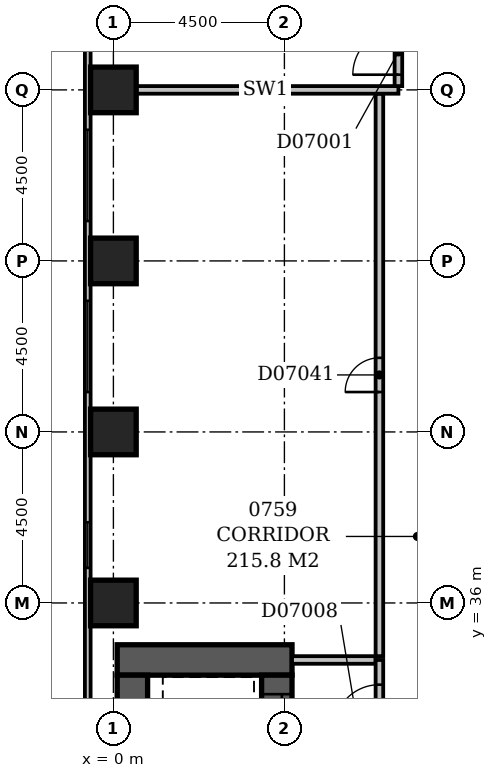
"""IFC4 building model, lengths in metres.
Left out: names, types, materials, properties, quantities, classifications, styles, units other than length and angle.
Written with IfcOpenShell. Run it as: python <this file> out.ifc"""

import sys

from ifc_helpers import new_model, si_unit, direction, frame, frame_2d, origin, origin_2d, place, context, subcontext, project, spatial, rectangle, extrude, element, fill, save


model = new_model("IFC4")
c1 = context("Model", 3, precision=1e-05, world=origin(), true_north=direction((0.0, 1.0)))
c2 = subcontext(c1, "Body", "Model", "MODEL_VIEW")
j1 = project(units=[si_unit("LENGTHUNIT", "METRE"), si_unit("PLANEANGLEUNIT", "RADIAN")], contexts=[c1])
p1 = place(None, origin())
s1 = spatial("IfcSite", under=j1, at=p1, CompositionType="ELEMENT")
p2 = place(p1, origin())
s2 = spatial("IfcBuilding", under=s1, at=p2, CompositionType="ELEMENT")
p3 = place(p2, frame((0.0, 0.0, 36.2)))
s3 = spatial("IfcBuildingStorey", under=s2, at=p3, CompositionType="ELEMENT", Elevation=36.2)
p4 = place(p3, frame((0.1, 34.5, -0.3), z_axis=(0.0, 0.0, 1.0), x_axis=(1.0, 0.0, 0.0)))
e1 = element("IfcWall", 1, at=p4, inside=s3, PredefinedType="SHEAR", context=c2, shape_type="SweptSolid", body=[
    extrude(rectangle(XDim=4.6, YDim=0.8, at=frame_2d((2.3, 0.0))), origin(), (0.0, 0.0, 1.0), 3.6),
])
p5 = place(p3, frame((0.5, 27.15, -0.3), z_axis=(0.0, 0.0, 1.0), x_axis=(0.0, 1.0, 0.0)))
e2 = element("IfcWall", 2, at=p5, inside=s3, PredefinedType="SHEAR", context=c2, shape_type="SweptSolid", body=[
    extrude(rectangle(XDim=6.95, YDim=0.8, at=frame_2d((3.475, 0.0))), origin(), (0.0, 0.0, 1.0), 3.6),
])
p6 = place(p3, frame((4.3, 27.15, -0.3), z_axis=(0.0, 0.0, 1.0), x_axis=(0.0, 1.0, 0.0)))
e3 = element("IfcWall", 3, at=p6, inside=s3, PredefinedType="SHEAR", context=c2, shape_type="SweptSolid", body=[
    extrude(rectangle(XDim=6.95, YDim=0.8, at=frame_2d((3.475, 0.0))), origin(), (0.0, 0.0, 1.0), 3.6),
])
p7 = place(p6, frame((3.05, 0.0, 0.3)))
e4 = element("IfcOpeningElement", 4, at=p7, cuts=e3, PredefinedType="OPENING", context=c2, shape_type="SweptSolid", body=[
    extrude(rectangle(XDim=1.1, YDim=2.1, at=frame_2d((0.55, 1.05))), frame((0.0, 0.412, 0.0), z_axis=(0.0, -1.0, 0.0), x_axis=(1.0, 0.0, 0.0)), (0.0, 0.0, 1.0), 0.824),
])
p8 = place(p6, frame((0.55, 0.0, 0.3)))
e5 = element("IfcOpeningElement", 5, at=p8, cuts=e3, PredefinedType="OPENING", context=c2, shape_type="SweptSolid", body=[
    extrude(rectangle(XDim=1.1, YDim=2.1, at=frame_2d((0.55, 1.05))), frame((0.0, 0.412, 0.0), z_axis=(0.0, -1.0, 0.0), x_axis=(1.0, 0.0, 0.0)), (0.0, 0.0, 1.0), 0.824),
])
p9 = place(p6, frame((5.35, 0.0, 0.3)))
e6 = element("IfcOpeningElement", 6, at=p9, cuts=e3, PredefinedType="OPENING", context=c2, shape_type="SweptSolid", body=[
    extrude(rectangle(XDim=1.1, YDim=2.1, at=frame_2d((0.55, 1.05))), frame((0.0, 0.412, 0.0), z_axis=(0.0, -1.0, 0.0), x_axis=(1.0, 0.0, 0.0)), (0.0, 0.0, 1.0), 0.824),
])
for number, where, z_axis, x_axis in (
    (7, (0.0, 36.0, -0.3), (0.0, 0.0, 1.0), (1.0, 0.0, 0.0)),
    (8, (0.0, 40.5, -0.3), (0.0, 0.0, 1.0), (1.0, 0.0, 0.0)),
    (9, (0.0, 45.0, -0.3), (0.0, 0.0, 1.0), (1.0, 0.0, 0.0)),
    (10, (0.0, 49.5, -0.3), (0.0, 0.0, 1.0), (1.0, 0.0, 0.0)),
):
    element("IfcColumn", number, at=place(p3, frame(where, z_axis=z_axis, x_axis=x_axis)), inside=s3, PredefinedType="COLUMN", context=c2, shape_type="SweptSolid", body=[
        extrude(rectangle(XDim=1.2, YDim=1.2, at=origin_2d()), origin(), (0.0, 0.0, 1.0), 3.6),
    ])
p10 = place(p3, frame((-0.675, 59.1, 0.0), z_axis=(0.0, 0.0, 1.0), x_axis=(0.0, -1.0, 0.0)))
e11 = element("IfcWall", 11, at=p10, inside=s3, PredefinedType="STANDARD", context=c2, shape_type="SweptSolid", body=[
    extrude(rectangle(XDim=55.35, YDim=0.15, at=frame_2d((27.675, 0.0))), origin(), (0.0, 0.0, 1.0), 2.7),
])
p11 = place(p10, frame((10.65, 0.0, 0.6)))
e12 = element("IfcOpeningElement", 12, at=p11, cuts=e11, PredefinedType="OPENING", context=c2, shape_type="SweptSolid", body=[
    extrude(rectangle(XDim=2.4, YDim=1.8, at=frame_2d((1.2, 0.9))), frame((0.0, 0.087, 0.0), z_axis=(0.0, -1.0, 0.0), x_axis=(1.0, 0.0, 0.0)), (0.0, 0.0, 1.0), 0.174),
])
p12 = place(p10, frame((15.15, 0.0, 0.6)))
e13 = element("IfcOpeningElement", 13, at=p12, cuts=e11, PredefinedType="OPENING", context=c2, shape_type="SweptSolid", body=[
    extrude(rectangle(XDim=2.4, YDim=1.8, at=frame_2d((1.2, 0.9))), frame((0.0, 0.087, 0.0), z_axis=(0.0, -1.0, 0.0), x_axis=(1.0, 0.0, 0.0)), (0.0, 0.0, 1.0), 0.174),
])
p13 = place(p10, frame((20.977, 0.0, 0.6)))
e14 = element("IfcOpeningElement", 14, at=p13, cuts=e11, PredefinedType="OPENING", context=c2, shape_type="SweptSolid", body=[
    extrude(rectangle(XDim=1.2, YDim=1.8, at=frame_2d((0.6, 0.9))), frame((0.0, 0.087, 0.0), z_axis=(0.0, -1.0, 0.0), x_axis=(1.0, 0.0, 0.0)), (0.0, 0.0, 1.0), 0.174),
])
p14 = place(p10, frame((42.15, 0.0, 0.6)))
e15 = element("IfcOpeningElement", 15, at=p14, cuts=e11, PredefinedType="OPENING", context=c2, shape_type="SweptSolid", body=[
    extrude(rectangle(XDim=2.4, YDim=1.8, at=frame_2d((1.2, 0.9))), frame((0.0, 0.087, 0.0), z_axis=(0.0, -1.0, 0.0), x_axis=(1.0, 0.0, 0.0)), (0.0, 0.0, 1.0), 0.174),
])
p15 = place(p3, frame((7.0, 32.1, 0.0), z_axis=(0.0, 0.0, 1.0), x_axis=(0.0, 1.0, 0.0)))
e16 = element("IfcWall", 16, at=p15, inside=s3, PredefinedType="PARTITIONING", context=c2, shape_type="SweptSolid", body=[
    extrude(rectangle(XDim=2.4, YDim=0.2, at=frame_2d((1.2, 0.0))), origin(), (0.0, 0.0, 1.0), 3.3),
])
p16 = place(p15, frame((0.55, 0.0, 0.0)))
e17 = element("IfcOpeningElement", 17, at=p16, cuts=e16, PredefinedType="OPENING", context=c2, shape_type="SweptSolid", body=[
    extrude(rectangle(XDim=1.2, YDim=2.1, at=frame_2d((0.6, 1.05))), frame((0.0, 0.112, 0.0), z_axis=(0.0, -1.0, 0.0), x_axis=(1.0, 0.0, 0.0)), (0.0, 0.0, 1.0), 0.224),
])
p17 = place(p3, frame((4.7, 34.5, 0.0), z_axis=(0.0, 0.0, 1.0), x_axis=(1.0, 0.0, 0.0)))
e18 = element("IfcWall", 18, at=p17, inside=s3, PredefinedType="PARTITIONING", context=c2, shape_type="SweptSolid", body=[
    extrude(rectangle(XDim=2.2, YDim=0.2, at=frame_2d((1.1, 0.0))), origin(), (0.0, 0.0, 1.0), 3.3),
])
p18 = place(p3, frame((0.5, 49.5, 0.0), z_axis=(0.0, 0.0, 1.0), x_axis=(1.0, 0.0, 0.0)))
e19 = element("IfcWall", 19, at=p18, inside=s3, PredefinedType="PARTITIONING", context=c2, shape_type="SweptSolid", body=[
    extrude(rectangle(XDim=7.0, YDim=0.2, at=frame_2d((3.5, 0.0))), origin(), (0.0, 0.0, 1.0), 3.3),
])
p19 = place(p3, frame((7.5, 49.6, 0.0), z_axis=(0.0, 0.0, 1.0), x_axis=(0.0, 1.0, 0.0)))
e20 = element("IfcWall", 20, at=p19, inside=s3, PredefinedType="PARTITIONING", context=c2, shape_type="SweptSolid", body=[
    extrude(rectangle(XDim=3.9, YDim=0.2, at=frame_2d((1.95, 0.0))), origin(), (0.0, 0.0, 1.0), 3.3),
])
p20 = place(p19, frame((0.3, 0.0, 0.0)))
e21 = element("IfcOpeningElement", 21, at=p20, cuts=e20, PredefinedType="OPENING", context=c2, shape_type="SweptSolid", body=[
    extrude(rectangle(XDim=1.2, YDim=2.1, at=frame_2d((0.6, 1.05))), frame((0.0, 0.112, 0.0), z_axis=(0.0, -1.0, 0.0), x_axis=(1.0, 0.0, 0.0)), (0.0, 0.0, 1.0), 0.224),
])
p21 = place(p3, frame((7.0, 34.6, 0.0), z_axis=(0.0, 0.0, 1.0), x_axis=(0.0, 1.0, 0.0)))
e22 = element("IfcWall", 22, at=p21, inside=s3, PredefinedType="PARTITIONING", context=c2, shape_type="SweptSolid", body=[
    extrude(rectangle(XDim=14.8, YDim=0.2, at=frame_2d((7.4, 0.0))), origin(), (0.0, 0.0, 1.0), 3.3),
])
p22 = place(p21, frame((6.95, 0.0, 0.0)))
e23 = element("IfcOpeningElement", 23, at=p22, cuts=e22, PredefinedType="OPENING", context=c2, shape_type="SweptSolid", body=[
    extrude(rectangle(XDim=0.9, YDim=2.1, at=frame_2d((0.45, 1.05))), frame((0.0, 0.112, 0.0), z_axis=(0.0, -1.0, 0.0), x_axis=(1.0, 0.0, 0.0)), (0.0, 0.0, 1.0), 0.224),
])
p23 = place(p11, origin())
e24 = element("IfcWindow", 24, at=p23, inside=s3, PartitioningType="SINGLE_PANEL", PredefinedType="WINDOW", context=c2, shape_type="SweptSolid", body=[
    extrude(rectangle(XDim=2.4, YDim=1.8, at=frame_2d((1.2, 0.9))), frame((0.0, 0.03, 0.0), z_axis=(0.0, -1.0, 0.0), x_axis=(1.0, 0.0, 0.0)), (0.0, 0.0, 1.0), 0.06),
])
fill(e12, e24)
p24 = place(p12, origin())
e25 = element("IfcWindow", 25, at=p24, inside=s3, PartitioningType="SINGLE_PANEL", PredefinedType="WINDOW", context=c2, shape_type="SweptSolid", body=[
    extrude(rectangle(XDim=2.4, YDim=1.8, at=frame_2d((1.2, 0.9))), frame((0.0, 0.03, 0.0), z_axis=(0.0, -1.0, 0.0), x_axis=(1.0, 0.0, 0.0)), (0.0, 0.0, 1.0), 0.06),
])
fill(e13, e25)
p25 = place(p13, origin())
e26 = element("IfcWindow", 26, at=p25, inside=s3, PartitioningType="SINGLE_PANEL", PredefinedType="WINDOW", context=c2, shape_type="SweptSolid", body=[
    extrude(rectangle(XDim=1.2, YDim=1.8, at=frame_2d((0.6, 0.9))), frame((0.0, 0.03, 0.0), z_axis=(0.0, -1.0, 0.0), x_axis=(1.0, 0.0, 0.0)), (0.0, 0.0, 1.0), 0.06),
])
fill(e14, e26)
p26 = place(p20, origin())
e27 = element("IfcDoor", 27, at=p26, inside=s3, OperationType="SINGLE_SWING_LEFT", PredefinedType="DOOR", context=c2, shape_type="SweptSolid", body=[
    extrude(rectangle(XDim=1.2, YDim=2.1, at=frame_2d((0.6, 1.05))), frame((0.0, 0.025, 0.0), z_axis=(0.0, -1.0, 0.0), x_axis=(1.0, 0.0, 0.0)), (0.0, 0.0, 1.0), 0.05),
])
fill(e21, e27)
p27 = place(p16, origin())
e28 = element("IfcDoor", 28, at=p27, inside=s3, OperationType="SINGLE_SWING_LEFT", PredefinedType="DOOR", context=c2, shape_type="SweptSolid", body=[
    extrude(rectangle(XDim=1.2, YDim=2.1, at=frame_2d((0.6, 1.05))), frame((0.0, 0.025, 0.0), z_axis=(0.0, -1.0, 0.0), x_axis=(1.0, 0.0, 0.0)), (0.0, 0.0, 1.0), 0.05),
])
fill(e17, e28)
p28 = place(p9, origin())
e29 = element("IfcDoor", 29, at=p28, inside=s3, OperationType="SLIDING_TO_LEFT", PredefinedType="DOOR", context=c2, shape_type="SweptSolid", body=[
    extrude(rectangle(XDim=1.1, YDim=2.1, at=frame_2d((0.55, 1.05))), frame((0.0, 0.025, 0.0), z_axis=(0.0, -1.0, 0.0), x_axis=(1.0, 0.0, 0.0)), (0.0, 0.0, 1.0), 0.05),
])
fill(e6, e29)
p29 = place(p22, origin())
e30 = element("IfcDoor", 30, at=p29, inside=s3, OperationType="SINGLE_SWING_LEFT", PredefinedType="DOOR", context=c2, shape_type="SweptSolid", body=[
    extrude(rectangle(XDim=0.9, YDim=2.1, at=frame_2d((0.45, 1.05))), frame((0.0, 0.025, 0.0), z_axis=(0.0, -1.0, 0.0), x_axis=(1.0, 0.0, 0.0)), (0.0, 0.0, 1.0), 0.05),
])
fill(e23, e30)
save(model, sys.argv[1])
